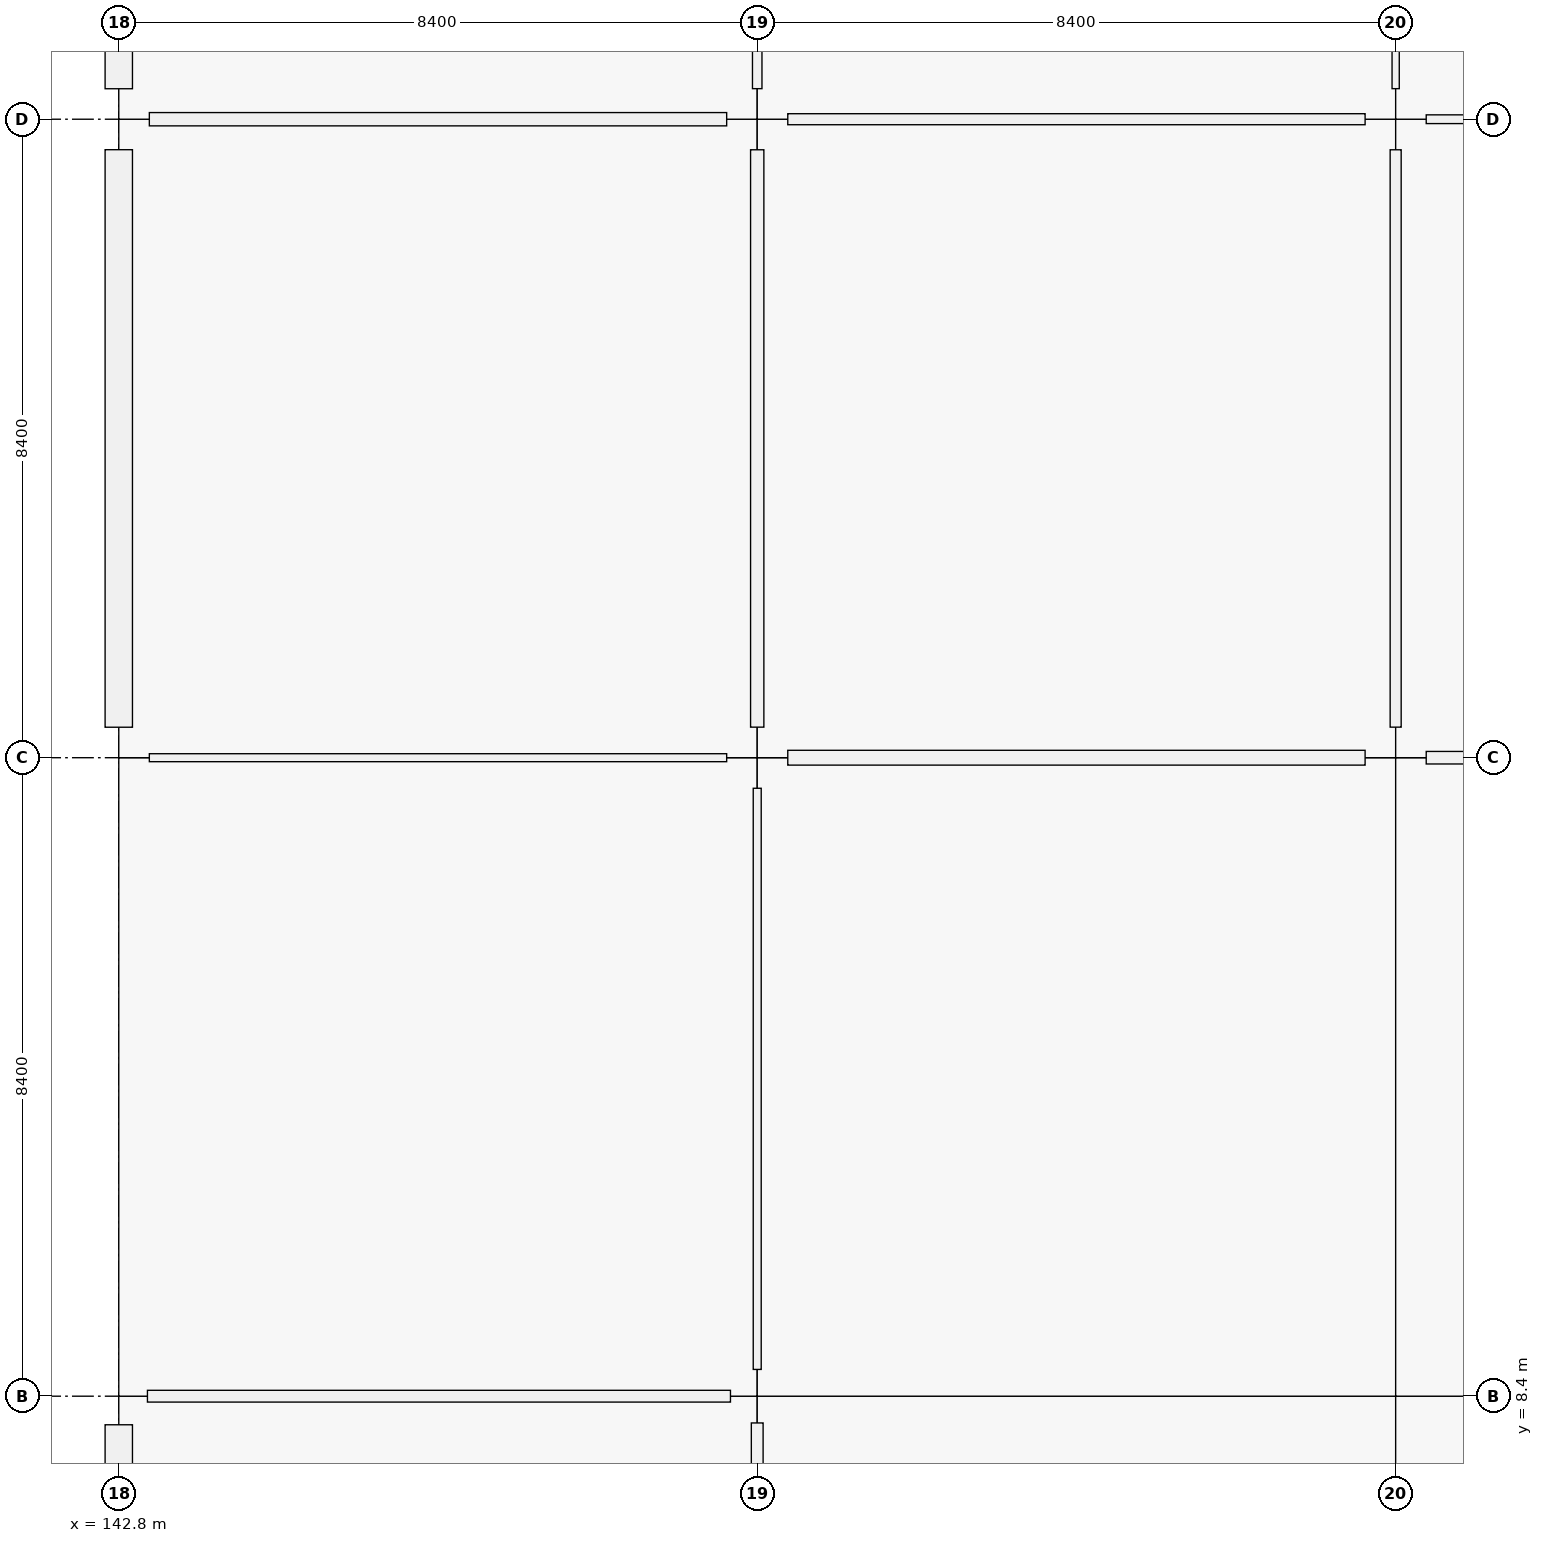
"""IFC4 building model, lengths in metres.
Left out: names, types, materials, properties, quantities, classifications, styles, units other than length and angle.
Written with IfcOpenShell. Run it as: python <this file> out.ifc"""

import sys

from ifc_helpers import new_model, si_unit, direction, frame, frame_2d, origin, origin_2d, place, context, subcontext, project, spatial, rectangle, extrude, element, fill, save


model = new_model("IFC4")
c1 = context("Model", 3, precision=1e-05, world=origin(), true_north=direction((0.0, 1.0)))
c2 = subcontext(c1, "Body", "Model", "MODEL_VIEW")
j1 = project(units=[si_unit("LENGTHUNIT", "METRE"), si_unit("PLANEANGLEUNIT", "RADIAN")], contexts=[c1])
p1 = place(None, origin())
s1 = spatial("IfcSite", under=j1, at=p1, CompositionType="ELEMENT")
p2 = place(p1, origin())
s2 = spatial("IfcBuilding", under=s1, at=p2, CompositionType="ELEMENT")
p3 = place(p2, origin())
s3 = spatial("IfcBuildingStorey", under=s2, at=p3, CompositionType="ELEMENT", Elevation=0.0)
p4 = place(p3, frame((142.8, 8.4, 0.0), z_axis=(0.0, 0.0, 1.0), x_axis=(1.0, 0.0, 0.0)))
e1 = element("IfcColumn", 1, at=p4, inside=s3, PredefinedType="COLUMN", context=c2, shape_type="SweptSolid", body=[
    extrude(rectangle(XDim=0.75, YDim=0.75, at=origin_2d()), origin(), (0.0, 0.0, 1.0), 5.76),
])
for number, where, z_axis, x_axis in (
    (2, (142.8, 16.8, 0.0), (0.0, 0.0, 1.0), (1.0, 0.0, 0.0)),
    (3, (142.8, 25.2, 0.0), (0.0, 0.0, 1.0), (1.0, 0.0, 0.0)),
):
    element("IfcColumn", number, at=place(p3, frame(where, z_axis=z_axis, x_axis=x_axis)), inside=s3, PredefinedType="COLUMN", context=c2, shape_type="SweptSolid", body=[
        extrude(rectangle(XDim=0.8, YDim=0.8, at=origin_2d()), origin(), (0.0, 0.0, 1.0), 5.76),
    ])
p5 = place(p3, frame((151.2, 8.4, 0.0), z_axis=(0.0, 0.0, 1.0), x_axis=(1.0, 0.0, 0.0)))
e4 = element("IfcColumn", 4, at=p5, inside=s3, PredefinedType="COLUMN", context=c2, shape_type="SweptSolid", body=[
    extrude(rectangle(XDim=0.7, YDim=0.7, at=origin_2d()), origin(), (0.0, 0.0, 1.0), 5.76),
])
for number, where, z_axis, x_axis in (
    (5, (151.2, 16.8, 0.0), (0.0, 0.0, 1.0), (1.0, 0.0, 0.0)),
    (6, (151.2, 25.2, 0.0), (0.0, 0.0, 1.0), (1.0, 0.0, 0.0)),
):
    element("IfcColumn", number, at=place(p3, frame(where, z_axis=z_axis, x_axis=x_axis)), inside=s3, PredefinedType="COLUMN", context=c2, shape_type="SweptSolid", body=[
        extrude(rectangle(XDim=0.8, YDim=0.8, at=origin_2d()), origin(), (0.0, 0.0, 1.0), 5.76),
    ])
p6 = place(p3, frame((159.6, 8.4, 0.0), z_axis=(0.0, 0.0, 1.0), x_axis=(1.0, 0.0, 0.0)))
e7 = element("IfcColumn", 7, at=p6, inside=s3, PredefinedType="COLUMN", context=c2, shape_type="SweptSolid", body=[
    extrude(rectangle(XDim=0.75, YDim=0.75, at=origin_2d()), origin(), (0.0, 0.0, 1.0), 5.76),
])
for number, where, z_axis, x_axis in (
    (8, (159.6, 16.8, 0.0), (0.0, 0.0, 1.0), (1.0, 0.0, 0.0)),
    (9, (159.6, 25.2, 0.0), (0.0, 0.0, 1.0), (1.0, 0.0, 0.0)),
):
    element("IfcColumn", number, at=place(p3, frame(where, z_axis=z_axis, x_axis=x_axis)), inside=s3, PredefinedType="COLUMN", context=c2, shape_type="SweptSolid", body=[
        extrude(rectangle(XDim=0.8, YDim=0.8, at=origin_2d()), origin(), (0.0, 0.0, 1.0), 5.76),
    ])
p7 = place(p3, frame((142.8, 0.301, 0.0), z_axis=(0.0, 0.0, 1.0), x_axis=(0.0, 1.0, 0.0)))
e10 = element("IfcWall", 10, at=p7, inside=s3, PredefinedType="SOLIDWALL", context=c2, shape_type="SweptSolid", body=[
    extrude(rectangle(XDim=7.723, YDim=0.36, at=frame_2d((3.861, 0.0))), origin(), (0.0, 0.0, 1.0), 4.7),
])
p8 = place(p7, frame((2.486, 0.0, 0.9)))
e11 = element("IfcOpeningElement", 11, at=p8, cuts=e10, PredefinedType="OPENING", context=c2, shape_type="SweptSolid", body=[
    extrude(rectangle(XDim=2.75, YDim=1.6, at=frame_2d((1.375, 0.8))), frame((0.0, 0.18, 0.0), z_axis=(0.0, -1.0, 0.0), x_axis=(1.0, 0.0, 0.0)), (0.0, 0.0, 1.0), 0.36),
])
p9 = place(p3, frame((142.8, 17.201, 0.0), z_axis=(0.0, 0.0, 1.0), x_axis=(0.0, 1.0, 0.0)))
e12 = element("IfcWall", 12, at=p9, inside=s3, PredefinedType="SOLIDWALL", context=c2, shape_type="SweptSolid", body=[
    extrude(rectangle(XDim=7.598, YDim=0.36, at=frame_2d((3.799, 0.0))), origin(), (0.0, 0.0, 1.0), 4.7),
])
p10 = place(p9, frame((3.024, 0.0, 0.9)))
e13 = element("IfcOpeningElement", 13, at=p10, cuts=e12, PredefinedType="OPENING", context=c2, shape_type="SweptSolid", body=[
    extrude(rectangle(XDim=1.55, YDim=1.6, at=frame_2d((0.775, 0.8))), frame((0.0, 0.18, 0.0), z_axis=(0.0, -1.0, 0.0), x_axis=(1.0, 0.0, 0.0)), (0.0, 0.0, 1.0), 0.36),
])
p11 = place(p3, frame((142.8, 25.601, 0.0), z_axis=(0.0, 0.0, 1.0), x_axis=(0.0, 1.0, 0.0)))
e14 = element("IfcWall", 14, at=p11, inside=s3, PredefinedType="SOLIDWALL", context=c2, shape_type="SweptSolid", body=[
    extrude(rectangle(XDim=7.598, YDim=0.36, at=frame_2d((3.799, 0.0))), origin(), (0.0, 0.0, 1.0), 4.7),
])
p12 = place(p11, frame((2.774, 0.0, 0.9)))
e15 = element("IfcOpeningElement", 15, at=p12, cuts=e14, PredefinedType="OPENING", context=c2, shape_type="SweptSolid", body=[
    extrude(rectangle(XDim=2.05, YDim=1.45, at=frame_2d((1.025, 0.725))), frame((0.0, 0.18, 0.0), z_axis=(0.0, -1.0, 0.0), x_axis=(1.0, 0.0, 0.0)), (0.0, 0.0, 1.0), 0.36),
])
p13 = place(p3, frame((143.177, 8.4, 0.0), z_axis=(0.0, 0.0, 1.0), x_axis=(1.0, 0.0, 0.0)))
e16 = element("IfcWall", 16, at=p13, inside=s3, PredefinedType="PARTITIONING", context=c2, shape_type="SweptSolid", body=[
    extrude(rectangle(XDim=7.671, YDim=0.155, at=frame_2d((3.835, 0.0))), origin(), (0.0, 0.0, 1.0), 3.66),
])
p14 = place(p13, frame((3.331, 0.0, 0.0)))
e17 = element("IfcOpeningElement", 17, at=p14, cuts=e16, PredefinedType="OPENING", context=c2, shape_type="SweptSolid", body=[
    extrude(rectangle(XDim=1.01, YDim=2.12, at=frame_2d((0.505, 1.06))), frame((0.0, 0.078, 0.0), z_axis=(0.0, -1.0, 0.0), x_axis=(1.0, 0.0, 0.0)), (0.0, 0.0, 1.0), 0.155),
])
p15 = place(p3, frame((143.202, 16.8, 0.0), z_axis=(0.0, 0.0, 1.0), x_axis=(1.0, 0.0, 0.0)))
e18 = element("IfcWall", 18, at=p15, inside=s3, PredefinedType="PARTITIONING", context=c2, shape_type="SweptSolid", body=[
    extrude(rectangle(XDim=7.596, YDim=0.105, at=frame_2d((3.798, 0.0))), origin(), (0.0, 0.0, 1.0), 3.66),
])
p16 = place(p15, frame((3.313, 0.0, 0.0)))
e19 = element("IfcOpeningElement", 19, at=p16, cuts=e18, PredefinedType="OPENING", context=c2, shape_type="SweptSolid", body=[
    extrude(rectangle(XDim=0.97, YDim=2.12, at=frame_2d((0.485, 1.06))), frame((0.0, 0.052, 0.0), z_axis=(0.0, -1.0, 0.0), x_axis=(1.0, 0.0, 0.0)), (0.0, 0.0, 1.0), 0.105),
])
p17 = place(p3, frame((143.202, 25.2, 0.0), z_axis=(0.0, 0.0, 1.0), x_axis=(1.0, 0.0, 0.0)))
e20 = element("IfcWall", 20, at=p17, inside=s3, PredefinedType="PARTITIONING", context=c2, shape_type="SweptSolid", body=[
    extrude(rectangle(XDim=7.596, YDim=0.175, at=frame_2d((3.798, 0.0))), origin(), (0.0, 0.0, 1.0), 3.66),
])
p18 = place(p17, frame((3.333, 0.0, 0.0)))
e21 = element("IfcOpeningElement", 21, at=p18, cuts=e20, PredefinedType="OPENING", context=c2, shape_type="SweptSolid", body=[
    extrude(rectangle(XDim=0.93, YDim=2.12, at=frame_2d((0.465, 1.06))), frame((0.0, 0.087, 0.0), z_axis=(0.0, -1.0, 0.0), x_axis=(1.0, 0.0, 0.0)), (0.0, 0.0, 1.0), 0.175),
])
p19 = place(p3, frame((151.602, 16.8, 0.0), z_axis=(0.0, 0.0, 1.0), x_axis=(1.0, 0.0, 0.0)))
e22 = element("IfcWall", 22, at=p19, inside=s3, PredefinedType="PARTITIONING", context=c2, shape_type="SweptSolid", body=[
    extrude(rectangle(XDim=7.596, YDim=0.195, at=frame_2d((3.798, 0.0))), origin(), (0.0, 0.0, 1.0), 3.66),
])
p20 = place(p19, frame((3.288, 0.0, 0.0)))
e23 = element("IfcOpeningElement", 23, at=p20, cuts=e22, PredefinedType="OPENING", context=c2, shape_type="SweptSolid", body=[
    extrude(rectangle(XDim=1.02, YDim=2.2, at=frame_2d((0.51, 1.1))), frame((0.0, 0.098, 0.0), z_axis=(0.0, -1.0, 0.0), x_axis=(1.0, 0.0, 0.0)), (0.0, 0.0, 1.0), 0.195),
])
p21 = place(p3, frame((151.602, 25.2, 0.0), z_axis=(0.0, 0.0, 1.0), x_axis=(1.0, 0.0, 0.0)))
e24 = element("IfcWall", 24, at=p21, inside=s3, PredefinedType="PARTITIONING", context=c2, shape_type="SweptSolid", body=[
    extrude(rectangle(XDim=7.596, YDim=0.145, at=frame_2d((3.798, 0.0))), origin(), (0.0, 0.0, 1.0), 3.66),
])
p22 = place(p21, frame((3.278, 0.0, 0.0)))
e25 = element("IfcOpeningElement", 25, at=p22, cuts=e24, PredefinedType="OPENING", context=c2, shape_type="SweptSolid", body=[
    extrude(rectangle(XDim=1.04, YDim=2.2, at=frame_2d((0.52, 1.1))), frame((0.0, 0.073, 0.0), z_axis=(0.0, -1.0, 0.0), x_axis=(1.0, 0.0, 0.0)), (0.0, 0.0, 1.0), 0.145),
])
p23 = place(p3, frame((160.002, 16.8, 0.0), z_axis=(0.0, 0.0, 1.0), x_axis=(1.0, 0.0, 0.0)))
e26 = element("IfcWall", 26, at=p23, inside=s3, PredefinedType="PARTITIONING", context=c2, shape_type="SweptSolid", body=[
    extrude(rectangle(XDim=7.596, YDim=0.165, at=frame_2d((3.798, 0.0))), origin(), (0.0, 0.0, 1.0), 3.66),
])
p24 = place(p23, frame((3.338, 0.0, 0.0)))
e27 = element("IfcOpeningElement", 27, at=p24, cuts=e26, PredefinedType="OPENING", context=c2, shape_type="SweptSolid", body=[
    extrude(rectangle(XDim=0.92, YDim=2.15, at=frame_2d((0.46, 1.075))), frame((0.0, 0.083, 0.0), z_axis=(0.0, -1.0, 0.0), x_axis=(1.0, 0.0, 0.0)), (0.0, 0.0, 1.0), 0.165),
])
p25 = place(p3, frame((160.002, 25.2, 0.0), z_axis=(0.0, 0.0, 1.0), x_axis=(1.0, 0.0, 0.0)))
e28 = element("IfcWall", 28, at=p25, inside=s3, PredefinedType="PARTITIONING", context=c2, shape_type="SweptSolid", body=[
    extrude(rectangle(XDim=7.596, YDim=0.115, at=frame_2d((3.798, 0.0))), origin(), (0.0, 0.0, 1.0), 3.66),
])
p26 = place(p25, frame((3.268, 0.0, 0.0)))
e29 = element("IfcOpeningElement", 29, at=p26, cuts=e28, PredefinedType="OPENING", context=c2, shape_type="SweptSolid", body=[
    extrude(rectangle(XDim=1.06, YDim=2.25, at=frame_2d((0.53, 1.125))), frame((0.0, 0.058, 0.0), z_axis=(0.0, -1.0, 0.0), x_axis=(1.0, 0.0, 0.0)), (0.0, 0.0, 1.0), 0.115),
])
p27 = place(p3, frame((151.2, 0.327, 0.0), z_axis=(0.0, 0.0, 1.0), x_axis=(0.0, 1.0, 0.0)))
e30 = element("IfcWall", 30, at=p27, inside=s3, PredefinedType="PARTITIONING", context=c2, shape_type="SweptSolid", body=[
    extrude(rectangle(XDim=7.721, YDim=0.155, at=frame_2d((3.861, 0.0))), origin(), (0.0, 0.0, 1.0), 3.66),
])
p28 = place(p27, frame((3.376, 0.0, 0.0)))
e31 = element("IfcOpeningElement", 31, at=p28, cuts=e30, PredefinedType="OPENING", context=c2, shape_type="SweptSolid", body=[
    extrude(rectangle(XDim=0.97, YDim=2.12, at=frame_2d((0.485, 1.06))), frame((0.0, 0.078, 0.0), z_axis=(0.0, -1.0, 0.0), x_axis=(1.0, 0.0, 0.0)), (0.0, 0.0, 1.0), 0.155),
])
p29 = place(p3, frame((151.2, 8.752, 0.0), z_axis=(0.0, 0.0, 1.0), x_axis=(0.0, 1.0, 0.0)))
e32 = element("IfcWall", 32, at=p29, inside=s3, PredefinedType="PARTITIONING", context=c2, shape_type="SweptSolid", body=[
    extrude(rectangle(XDim=7.646, YDim=0.105, at=frame_2d((3.823, 0.0))), origin(), (0.0, 0.0, 1.0), 3.66),
])
p30 = place(p29, frame((3.358, 0.0, 0.0)))
e33 = element("IfcOpeningElement", 33, at=p30, cuts=e32, PredefinedType="OPENING", context=c2, shape_type="SweptSolid", body=[
    extrude(rectangle(XDim=0.93, YDim=2.12, at=frame_2d((0.465, 1.06))), frame((0.0, 0.052, 0.0), z_axis=(0.0, -1.0, 0.0), x_axis=(1.0, 0.0, 0.0)), (0.0, 0.0, 1.0), 0.105),
])
p31 = place(p3, frame((151.2, 17.202, 0.0), z_axis=(0.0, 0.0, 1.0), x_axis=(0.0, 1.0, 0.0)))
e34 = element("IfcWall", 34, at=p31, inside=s3, PredefinedType="PARTITIONING", context=c2, shape_type="SweptSolid", body=[
    extrude(rectangle(XDim=7.596, YDim=0.175, at=frame_2d((3.798, 0.0))), origin(), (0.0, 0.0, 1.0), 3.66),
])
p32 = place(p31, frame((3.278, 0.0, 0.0)))
e35 = element("IfcOpeningElement", 35, at=p32, cuts=e34, PredefinedType="OPENING", context=c2, shape_type="SweptSolid", body=[
    extrude(rectangle(XDim=1.04, YDim=2.2, at=frame_2d((0.52, 1.1))), frame((0.0, 0.087, 0.0), z_axis=(0.0, -1.0, 0.0), x_axis=(1.0, 0.0, 0.0)), (0.0, 0.0, 1.0), 0.175),
])
p33 = place(p3, frame((151.2, 25.602, 0.0), z_axis=(0.0, 0.0, 1.0), x_axis=(0.0, 1.0, 0.0)))
e36 = element("IfcWall", 36, at=p33, inside=s3, PredefinedType="PARTITIONING", context=c2, shape_type="SweptSolid", body=[
    extrude(rectangle(XDim=7.621, YDim=0.125, at=frame_2d((3.811, 0.0))), origin(), (0.0, 0.0, 1.0), 3.66),
])
p34 = place(p33, frame((3.301, 0.0, 0.0)))
e37 = element("IfcOpeningElement", 37, at=p34, cuts=e36, PredefinedType="OPENING", context=c2, shape_type="SweptSolid", body=[
    extrude(rectangle(XDim=1.02, YDim=2.2, at=frame_2d((0.51, 1.1))), frame((0.0, 0.062, 0.0), z_axis=(0.0, -1.0, 0.0), x_axis=(1.0, 0.0, 0.0)), (0.0, 0.0, 1.0), 0.125),
])
p35 = place(p3, frame((159.6, 17.202, 0.0), z_axis=(0.0, 0.0, 1.0), x_axis=(0.0, 1.0, 0.0)))
e38 = element("IfcWall", 38, at=p35, inside=s3, PredefinedType="PARTITIONING", context=c2, shape_type="SweptSolid", body=[
    extrude(rectangle(XDim=7.596, YDim=0.145, at=frame_2d((3.798, 0.0))), origin(), (0.0, 0.0, 1.0), 3.66),
])
p36 = place(p35, frame((3.273, 0.0, 0.0)))
e39 = element("IfcOpeningElement", 39, at=p36, cuts=e38, PredefinedType="OPENING", context=c2, shape_type="SweptSolid", body=[
    extrude(rectangle(XDim=1.05, YDim=2.12, at=frame_2d((0.525, 1.06))), frame((0.0, 0.073, 0.0), z_axis=(0.0, -1.0, 0.0), x_axis=(1.0, 0.0, 0.0)), (0.0, 0.0, 1.0), 0.145),
])
p37 = place(p3, frame((159.6, 25.602, 0.0), z_axis=(0.0, 0.0, 1.0), x_axis=(0.0, 1.0, 0.0)))
e40 = element("IfcWall", 40, at=p37, inside=s3, PredefinedType="PARTITIONING", context=c2, shape_type="SweptSolid", body=[
    extrude(rectangle(XDim=7.596, YDim=0.095, at=frame_2d((3.798, 0.0))), origin(), (0.0, 0.0, 1.0), 3.66),
])
p38 = place(p37, frame((3.328, 0.0, 0.0)))
e41 = element("IfcOpeningElement", 41, at=p38, cuts=e40, PredefinedType="OPENING", context=c2, shape_type="SweptSolid", body=[
    extrude(rectangle(XDim=0.94, YDim=2.15, at=frame_2d((0.47, 1.075))), frame((0.0, 0.047, 0.0), z_axis=(0.0, -1.0, 0.0), x_axis=(1.0, 0.0, 0.0)), (0.0, 0.0, 1.0), 0.095),
])
p39 = place(p10, origin())
e42 = element("IfcWindow", 42, at=p39, inside=s3, PartitioningType="SINGLE_PANEL", PredefinedType="WINDOW", context=c2, shape_type="SweptSolid", body=[
    extrude(rectangle(XDim=1.55, YDim=1.6, at=frame_2d((0.775, 0.8))), frame((0.0, 0.03, 0.0), z_axis=(0.0, -1.0, 0.0), x_axis=(1.0, 0.0, 0.0)), (0.0, 0.0, 1.0), 0.06),
])
fill(e13, e42)
p40 = place(p14, origin())
e43 = element("IfcDoor", 43, at=p40, inside=s3, OperationType="SINGLE_SWING_RIGHT", PredefinedType="DOOR", context=c2, shape_type="SweptSolid", body=[
    extrude(rectangle(XDim=1.01, YDim=2.12, at=frame_2d((0.505, 1.06))), frame((0.0, 0.025, 0.0), z_axis=(0.0, -1.0, 0.0), x_axis=(1.0, 0.0, 0.0)), (0.0, 0.0, 1.0), 0.05),
])
fill(e17, e43)
p41 = place(p16, origin())
e44 = element("IfcDoor", 44, at=p41, inside=s3, OperationType="SINGLE_SWING_LEFT", PredefinedType="DOOR", context=c2, shape_type="SweptSolid", body=[
    extrude(rectangle(XDim=0.97, YDim=2.12, at=frame_2d((0.485, 1.06))), frame((0.0, 0.025, 0.0), z_axis=(0.0, -1.0, 0.0), x_axis=(1.0, 0.0, 0.0)), (0.0, 0.0, 1.0), 0.05),
])
fill(e19, e44)
p42 = place(p18, origin())
e45 = element("IfcDoor", 45, at=p42, inside=s3, OperationType="SINGLE_SWING_RIGHT", PredefinedType="DOOR", context=c2, shape_type="SweptSolid", body=[
    extrude(rectangle(XDim=0.93, YDim=2.12, at=frame_2d((0.465, 1.06))), frame((0.0, 0.025, 0.0), z_axis=(0.0, -1.0, 0.0), x_axis=(1.0, 0.0, 0.0)), (0.0, 0.0, 1.0), 0.05),
])
fill(e21, e45)
p43 = place(p20, origin())
e46 = element("IfcDoor", 46, at=p43, inside=s3, OperationType="SINGLE_SWING_RIGHT", PredefinedType="DOOR", context=c2, shape_type="SweptSolid", body=[
    extrude(rectangle(XDim=1.02, YDim=2.2, at=frame_2d((0.51, 1.1))), frame((0.0, 0.025, 0.0), z_axis=(0.0, -1.0, 0.0), x_axis=(1.0, 0.0, 0.0)), (0.0, 0.0, 1.0), 0.05),
])
fill(e23, e46)
p44 = place(p30, origin())
e47 = element("IfcDoor", 47, at=p44, inside=s3, OperationType="SINGLE_SWING_LEFT", PredefinedType="DOOR", context=c2, shape_type="SweptSolid", body=[
    extrude(rectangle(XDim=0.93, YDim=2.12, at=frame_2d((0.465, 1.06))), frame((0.0, 0.025, 0.0), z_axis=(0.0, -1.0, 0.0), x_axis=(1.0, 0.0, 0.0)), (0.0, 0.0, 1.0), 0.05),
])
fill(e33, e47)
p45 = place(p22, origin())
e48 = element("IfcDoor", 48, at=p45, inside=s3, OperationType="SINGLE_SWING_LEFT", PredefinedType="DOOR", context=c2, shape_type="SweptSolid", body=[
    extrude(rectangle(XDim=1.04, YDim=2.2, at=frame_2d((0.52, 1.1))), frame((0.0, 0.025, 0.0), z_axis=(0.0, -1.0, 0.0), x_axis=(1.0, 0.0, 0.0)), (0.0, 0.0, 1.0), 0.05),
])
fill(e25, e48)
p46 = place(p32, origin())
e49 = element("IfcDoor", 49, at=p46, inside=s3, OperationType="SINGLE_SWING_RIGHT", PredefinedType="DOOR", context=c2, shape_type="SweptSolid", body=[
    extrude(rectangle(XDim=1.04, YDim=2.2, at=frame_2d((0.52, 1.1))), frame((0.0, 0.025, 0.0), z_axis=(0.0, -1.0, 0.0), x_axis=(1.0, 0.0, 0.0)), (0.0, 0.0, 1.0), 0.05),
])
fill(e35, e49)
p47 = place(p36, origin())
e50 = element("IfcDoor", 50, at=p47, inside=s3, OperationType="SINGLE_SWING_LEFT", PredefinedType="DOOR", context=c2, shape_type="SweptSolid", body=[
    extrude(rectangle(XDim=1.05, YDim=2.12, at=frame_2d((0.525, 1.06))), frame((0.0, 0.025, 0.0), z_axis=(0.0, -1.0, 0.0), x_axis=(1.0, 0.0, 0.0)), (0.0, 0.0, 1.0), 0.05),
])
fill(e39, e50)
save(model, sys.argv[1])
